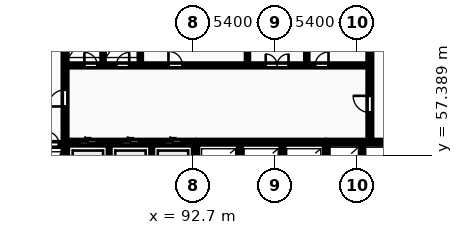
"""IFC4 building model, lengths in metres.
Left out: names, types, materials, properties, quantities, classifications, styles, units other than length and angle.
Written with IfcOpenShell. Run it as: python <this file> out.ifc"""

import sys

from ifc_helpers import new_model, si_unit, direction, frame, frame_2d, origin, place, context, subcontext, project, spatial, rectangle, extrude, element, fill, save


model = new_model("IFC4")
c1 = context("Model", 3, precision=1e-05, world=origin(), true_north=direction((0.0, 1.0)))
c2 = subcontext(c1, "Body", "Model", "MODEL_VIEW")
j1 = project(units=[si_unit("LENGTHUNIT", "METRE"), si_unit("PLANEANGLEUNIT", "RADIAN")], contexts=[c1])
p1 = place(None, origin())
s1 = spatial("IfcSite", under=j1, at=p1, CompositionType="ELEMENT")
p2 = place(p1, origin())
s2 = spatial("IfcBuilding", under=s1, at=p2, CompositionType="ELEMENT")
p3 = place(p2, frame((0.0, 0.0, 10.0)))
s3 = spatial("IfcBuildingStorey", under=s2, at=p3, CompositionType="ELEMENT", Elevation=10.0)
p4 = place(p3, frame((79.79, 58.1, 0.0), z_axis=(0.0, 0.0, 1.0), x_axis=(1.0, 0.0, 0.0)))
e1 = element("IfcWall", 1, at=p4, inside=s3, PredefinedType="SHEAR", context=c2, shape_type="SweptSolid", body=[
    extrude(rectangle(XDim=4.39, YDim=0.25, at=frame_2d((2.195, 0.0))), origin(), (0.0, 0.0, 1.0), 4.5),
])
p5 = place(p4, frame((1.05, 0.0, 0.0)))
e2 = element("IfcOpeningElement", 2, at=p5, cuts=e1, PredefinedType="OPENING", context=c2, shape_type="SweptSolid", body=[
    extrude(rectangle(XDim=1.12, YDim=2.12, at=frame_2d((0.56, 1.06))), frame((0.0, 0.135, 0.0), z_axis=(0.0, -1.0, 0.0), x_axis=(1.0, 0.0, 0.0)), (0.0, 0.0, 1.0), 0.27),
])
p6 = place(p4, frame((3.26, 0.0, 0.0)))
e3 = element("IfcOpeningElement", 3, at=p6, cuts=e1, PredefinedType="OPENING", context=c2, shape_type="SweptSolid", body=[
    extrude(rectangle(XDim=0.85, YDim=2.05, at=frame_2d((0.425, 1.025))), frame((0.0, 0.135, 0.0), z_axis=(0.0, -1.0, 0.0), x_axis=(1.0, 0.0, 0.0)), (0.0, 0.0, 1.0), 0.27),
])
p7 = place(p3, frame((84.3, 55.4, 0.0), z_axis=(0.0, 0.0, 1.0), x_axis=(0.0, 1.0, 0.0)))
e4 = element("IfcWall", 4, at=p7, inside=s3, PredefinedType="SHEAR", context=c2, shape_type="SweptSolid", body=[
    extrude(rectangle(XDim=11.6, YDim=0.25, at=frame_2d((5.8, 0.0))), origin(), (0.0, 0.0, 1.0), 4.5),
])
p8 = place(p7, frame((5.2, 0.0, 0.0)))
e5 = element("IfcOpeningElement", 5, at=p8, cuts=e4, PredefinedType="OPENING", context=c2, shape_type="SweptSolid", body=[
    extrude(rectangle(XDim=1.1, YDim=2.1, at=frame_2d((0.55, 1.05))), frame((0.0, 0.135, 0.0), z_axis=(0.0, -1.0, 0.0), x_axis=(1.0, 0.0, 0.0)), (0.0, 0.0, 1.0), 0.27),
])
for number, where, z_axis, x_axis in (
    (6, (87.2, 55.4, 0.0), (0.0, 0.0, 1.0), (0.0, 1.0, 0.0)),
    (7, (90.0, 55.4, 0.0), (0.0, 0.0, 1.0), (0.0, 1.0, 0.0)),
):
    element("IfcWall", number, at=place(p3, frame(where, z_axis=z_axis, x_axis=x_axis)), inside=s3, PredefinedType="PARTITIONING", context=c2, shape_type="SweptSolid", body=[
        extrude(rectangle(XDim=2.72, YDim=0.2, at=frame_2d((1.36, 0.0))), origin(), (0.0, 0.0, 1.0), 4.2),
    ])
p9 = place(p3, frame((84.42, 58.25, 0.0), z_axis=(0.0, 0.0, 1.0), x_axis=(1.0, 0.0, 0.0)))
e8 = element("IfcWall", 8, at=p9, inside=s3, PredefinedType="SHEAR", context=c2, shape_type="SweptSolid", body=[
    extrude(rectangle(XDim=8.36, YDim=0.25, at=frame_2d((4.18, 0.0))), origin(), (0.0, 0.0, 1.0), 4.5),
])
p10 = place(p9, frame((0.82, 0.0, 0.0)))
e9 = element("IfcOpeningElement", 9, at=p10, cuts=e8, PredefinedType="OPENING", context=c2, shape_type="SweptSolid", body=[
    extrude(rectangle(XDim=1.12, YDim=2.12, at=frame_2d((0.56, 1.06))), frame((0.0, 0.135, 0.0), z_axis=(0.0, -1.0, 0.0), x_axis=(1.0, 0.0, 0.0)), (0.0, 0.0, 1.0), 0.27),
])
p11 = place(p9, frame((3.62, 0.0, 0.0)))
e10 = element("IfcOpeningElement", 10, at=p11, cuts=e8, PredefinedType="OPENING", context=c2, shape_type="SweptSolid", body=[
    extrude(rectangle(XDim=1.12, YDim=2.12, at=frame_2d((0.56, 1.06))), frame((0.0, 0.135, 0.0), z_axis=(0.0, -1.0, 0.0), x_axis=(1.0, 0.0, 0.0)), (0.0, 0.0, 1.0), 0.27),
])
p12 = place(p9, frame((6.42, 0.0, 0.0)))
e11 = element("IfcOpeningElement", 11, at=p12, cuts=e8, PredefinedType="OPENING", context=c2, shape_type="SweptSolid", body=[
    extrude(rectangle(XDim=1.12, YDim=2.12, at=frame_2d((0.56, 1.06))), frame((0.0, 0.135, 0.0), z_axis=(0.0, -1.0, 0.0), x_axis=(1.0, 0.0, 0.0)), (0.0, 0.0, 1.0), 0.27),
])
p13 = place(p3, frame((92.9, 55.4, 0.0), z_axis=(0.0, 0.0, 1.0), x_axis=(0.0, 1.0, 0.0)))
e12 = element("IfcWall", 12, at=p13, inside=s3, PredefinedType="SHEAR", context=c2, shape_type="SweptSolid", body=[
    extrude(rectangle(XDim=2.85, YDim=0.25, at=frame_2d((1.425, 0.0))), origin(), (0.0, 0.0, 1.0), 4.5),
])
for number, where, z_axis, x_axis in (
    (13, (95.8, 55.4, 0.0), (0.0, 0.0, 1.0), (0.0, 1.0, 0.0)),
    (14, (98.6, 55.4, 0.0), (0.0, 0.0, 1.0), (0.0, 1.0, 0.0)),
):
    element("IfcWall", number, at=place(p3, frame(where, z_axis=z_axis, x_axis=x_axis)), inside=s3, PredefinedType="PARTITIONING", context=c2, shape_type="SweptSolid", body=[
        extrude(rectangle(XDim=2.72, YDim=0.2, at=frame_2d((1.36, 0.0))), origin(), (0.0, 0.0, 1.0), 4.2),
    ])
p14 = place(p3, frame((93.02, 58.25, 0.0), z_axis=(0.0, 0.0, 1.0), x_axis=(1.0, 0.0, 0.0)))
e15 = element("IfcWall", 15, at=p14, inside=s3, PredefinedType="SHEAR", context=c2, shape_type="SweptSolid", body=[
    extrude(rectangle(XDim=8.36, YDim=0.25, at=frame_2d((4.18, 0.0))), origin(), (0.0, 0.0, 1.0), 4.5),
])
p15 = place(p3, frame((101.48, 55.4, 0.0), z_axis=(0.0, 0.0, 1.0), x_axis=(0.0, 1.0, 0.0)))
e16 = element("IfcWall", 16, at=p15, inside=s3, PredefinedType="SHEAR", context=c2, shape_type="SweptSolid", body=[
    extrude(rectangle(XDim=2.85, YDim=0.25, at=frame_2d((1.425, 0.0))), origin(), (0.0, 0.0, 1.0), 4.5),
])
p16 = place(p3, frame((103.85, 55.4, 0.0), z_axis=(0.0, 0.0, 1.0), x_axis=(0.0, 1.0, 0.0)))
e17 = element("IfcWall", 17, at=p16, inside=s3, PredefinedType="PARTITIONING", context=c2, shape_type="SweptSolid", body=[
    extrude(rectangle(XDim=2.72, YDim=0.2, at=frame_2d((1.36, 0.0))), origin(), (0.0, 0.0, 1.0), 4.2),
])
p17 = place(p3, frame((101.55, 58.25, 0.0), z_axis=(0.0, 0.0, 1.0), x_axis=(1.0, 0.0, 0.0)))
e18 = element("IfcWall", 18, at=p17, inside=s3, PredefinedType="SHEAR", context=c2, shape_type="SweptSolid", body=[
    extrude(rectangle(XDim=4.6, YDim=0.25, at=frame_2d((2.3, 0.0))), origin(), (0.0, 0.0, 1.0), 4.5),
])
for number, where, z_axis, x_axis in (
    (19, (86.8, 63.4, 0.0), (0.0, 0.0, 1.0), (0.0, 1.0, 0.0)),
    (20, (89.25, 63.4, 0.0), (0.0, 0.0, 1.0), (0.0, 1.0, 0.0)),
    (21, (96.3, 63.4, 0.0), (0.0, 0.0, 1.0), (0.0, 1.0, 0.0)),
    (22, (100.2, 63.4, 0.0), (0.0, 0.0, 1.0), (0.0, 1.0, 0.0)),
):
    element("IfcWall", number, at=place(p3, frame(where, z_axis=z_axis, x_axis=x_axis)), inside=s3, PredefinedType="PARTITIONING", context=c2, shape_type="SweptSolid", body=[
        extrude(rectangle(XDim=3.6, YDim=0.15, at=frame_2d((1.8, 0.0))), origin(), (0.0, 0.0, 1.0), 4.2),
    ])
p18 = place(p3, frame((84.42, 63.3, 0.0), z_axis=(0.0, 0.0, 1.0), x_axis=(1.0, 0.0, 0.0)))
e23 = element("IfcWall", 23, at=p18, inside=s3, PredefinedType="PARTITIONING", context=c2, shape_type="SweptSolid", body=[
    extrude(rectangle(XDim=19.83, YDim=0.2, at=frame_2d((9.915, 0.0))), origin(), (0.0, 0.0, 1.0), 4.2),
])
p19 = place(p18, frame((1.15, 0.0, 0.0)))
e24 = element("IfcOpeningElement", 24, at=p19, cuts=e23, PredefinedType="OPENING", context=c2, shape_type="SweptSolid", body=[
    extrude(rectangle(XDim=0.85, YDim=2.05, at=frame_2d((0.425, 1.025))), frame((0.0, 0.11, 0.0), z_axis=(0.0, -1.0, 0.0), x_axis=(1.0, 0.0, 0.0)), (0.0, 0.0, 1.0), 0.22),
])
p20 = place(p18, frame((3.25, 0.0, 0.0)))
e25 = element("IfcOpeningElement", 25, at=p20, cuts=e23, PredefinedType="OPENING", context=c2, shape_type="SweptSolid", body=[
    extrude(rectangle(XDim=0.85, YDim=2.05, at=frame_2d((0.425, 1.025))), frame((0.0, 0.11, 0.0), z_axis=(0.0, -1.0, 0.0), x_axis=(1.0, 0.0, 0.0)), (0.0, 0.0, 1.0), 0.22),
])
p21 = place(p18, frame((13.08, 0.0, 0.0)))
e26 = element("IfcOpeningElement", 26, at=p21, cuts=e23, PredefinedType="OPENING", context=c2, shape_type="SweptSolid", body=[
    extrude(rectangle(XDim=1.5, YDim=2.2, at=frame_2d((0.75, 1.1))), frame((0.0, 0.11, 0.0), z_axis=(0.0, -1.0, 0.0), x_axis=(1.0, 0.0, 0.0)), (0.0, 0.0, 1.0), 0.22),
])
p22 = place(p18, frame((6.68, 0.0, 0.0)))
e27 = element("IfcOpeningElement", 27, at=p22, cuts=e23, PredefinedType="OPENING", context=c2, shape_type="SweptSolid", body=[
    extrude(rectangle(XDim=0.92, YDim=2.08, at=frame_2d((0.46, 1.04))), frame((0.0, 0.11, 0.0), z_axis=(0.0, -1.0, 0.0), x_axis=(1.0, 0.0, 0.0)), (0.0, 0.0, 1.0), 0.22),
])
p23 = place(p18, frame((16.33, 0.0, 0.0)))
e28 = element("IfcOpeningElement", 28, at=p23, cuts=e23, PredefinedType="OPENING", context=c2, shape_type="SweptSolid", body=[
    extrude(rectangle(XDim=0.88, YDim=2.06, at=frame_2d((0.44, 1.03))), frame((0.0, 0.11, 0.0), z_axis=(0.0, -1.0, 0.0), x_axis=(1.0, 0.0, 0.0)), (0.0, 0.0, 1.0), 0.22),
])
p24 = place(p3, frame((104.35, 58.4, 0.0), z_axis=(0.0, 0.0, 1.0), x_axis=(0.0, 1.0, 0.0)))
e29 = element("IfcWall", 29, at=p24, inside=s3, PredefinedType="SHEAR", context=c2, shape_type="SweptSolid", body=[
    extrude(rectangle(XDim=8.6, YDim=0.25, at=frame_2d((4.3, 0.0))), origin(), (0.0, 0.0, 1.0), 4.5),
])
p25 = place(p24, frame((1.8, 0.0, 0.0)))
e30 = element("IfcOpeningElement", 30, at=p25, cuts=e29, PredefinedType="OPENING", context=c2, shape_type="SweptSolid", body=[
    extrude(rectangle(XDim=1.1, YDim=2.1, at=frame_2d((0.55, 1.05))), frame((0.0, 0.135, 0.0), z_axis=(0.0, -1.0, 0.0), x_axis=(1.0, 0.0, 0.0)), (0.0, 0.0, 1.0), 0.27),
])
p26 = place(p6, origin())
e31 = element("IfcDoor", 31, at=p26, inside=s3, OperationType="SINGLE_SWING_LEFT", PredefinedType="DOOR", context=c2, shape_type="SweptSolid", body=[
    extrude(rectangle(XDim=0.85, YDim=2.05, at=frame_2d((0.425, 1.025))), frame((0.0, 0.025, 0.0), z_axis=(0.0, -1.0, 0.0), x_axis=(1.0, 0.0, 0.0)), (0.0, 0.0, 1.0), 0.05),
])
fill(e3, e31)
p27 = place(p8, origin())
e32 = element("IfcDoor", 32, at=p27, inside=s3, OperationType="SINGLE_SWING_LEFT", PredefinedType="DOOR", context=c2, shape_type="SweptSolid", body=[
    extrude(rectangle(XDim=1.1, YDim=2.1, at=frame_2d((0.55, 1.05))), frame((0.0, 0.025, 0.0), z_axis=(0.0, -1.0, 0.0), x_axis=(1.0, 0.0, 0.0)), (0.0, 0.0, 1.0), 0.05),
])
fill(e5, e32)
p28 = place(p10, origin())
e33 = element("IfcDoor", 33, at=p28, inside=s3, OperationType="SLIDING_TO_LEFT", PredefinedType="DOOR", context=c2, shape_type="SweptSolid", body=[
    extrude(rectangle(XDim=1.12, YDim=2.12, at=frame_2d((0.56, 1.06))), frame((0.0, 0.025, 0.0), z_axis=(0.0, -1.0, 0.0), x_axis=(1.0, 0.0, 0.0)), (0.0, 0.0, 1.0), 0.05),
])
fill(e9, e33)
p29 = place(p11, origin())
e34 = element("IfcDoor", 34, at=p29, inside=s3, OperationType="SLIDING_TO_LEFT", PredefinedType="DOOR", context=c2, shape_type="SweptSolid", body=[
    extrude(rectangle(XDim=1.12, YDim=2.12, at=frame_2d((0.56, 1.06))), frame((0.0, 0.025, 0.0), z_axis=(0.0, -1.0, 0.0), x_axis=(1.0, 0.0, 0.0)), (0.0, 0.0, 1.0), 0.05),
])
fill(e10, e34)
p30 = place(p12, origin())
e35 = element("IfcDoor", 35, at=p30, inside=s3, OperationType="SLIDING_TO_LEFT", PredefinedType="DOOR", context=c2, shape_type="SweptSolid", body=[
    extrude(rectangle(XDim=1.12, YDim=2.12, at=frame_2d((0.56, 1.06))), frame((0.0, 0.025, 0.0), z_axis=(0.0, -1.0, 0.0), x_axis=(1.0, 0.0, 0.0)), (0.0, 0.0, 1.0), 0.05),
])
fill(e11, e35)
p31 = place(p19, origin())
e36 = element("IfcDoor", 36, at=p31, inside=s3, OperationType="SINGLE_SWING_LEFT", PredefinedType="DOOR", context=c2, shape_type="SweptSolid", body=[
    extrude(rectangle(XDim=0.85, YDim=2.05, at=frame_2d((0.425, 1.025))), frame((0.0, 0.025, 0.0), z_axis=(0.0, -1.0, 0.0), x_axis=(1.0, 0.0, 0.0)), (0.0, 0.0, 1.0), 0.05),
])
fill(e24, e36)
p32 = place(p20, origin())
e37 = element("IfcDoor", 37, at=p32, inside=s3, OperationType="SINGLE_SWING_RIGHT", PredefinedType="DOOR", context=c2, shape_type="SweptSolid", body=[
    extrude(rectangle(XDim=0.85, YDim=2.05, at=frame_2d((0.425, 1.025))), frame((0.0, 0.025, 0.0), z_axis=(0.0, -1.0, 0.0), x_axis=(1.0, 0.0, 0.0)), (0.0, 0.0, 1.0), 0.05),
])
fill(e25, e37)
p33 = place(p21, origin())
e38 = element("IfcDoor", 38, at=p33, inside=s3, OperationType="DOUBLE_DOOR_SINGLE_SWING", PredefinedType="DOOR", context=c2, shape_type="SweptSolid", body=[
    extrude(rectangle(XDim=1.5, YDim=2.2, at=frame_2d((0.75, 1.1))), frame((0.0, 0.025, 0.0), z_axis=(0.0, -1.0, 0.0), x_axis=(1.0, 0.0, 0.0)), (0.0, 0.0, 1.0), 0.05),
])
fill(e26, e38)
p34 = place(p22, origin())
e39 = element("IfcDoor", 39, at=p34, inside=s3, OperationType="SINGLE_SWING_LEFT", PredefinedType="DOOR", context=c2, shape_type="SweptSolid", body=[
    extrude(rectangle(XDim=0.92, YDim=2.08, at=frame_2d((0.46, 1.04))), frame((0.0, 0.025, 0.0), z_axis=(0.0, -1.0, 0.0), x_axis=(1.0, 0.0, 0.0)), (0.0, 0.0, 1.0), 0.05),
])
fill(e27, e39)
p35 = place(p23, origin())
e40 = element("IfcDoor", 40, at=p35, inside=s3, OperationType="SINGLE_SWING_RIGHT", PredefinedType="DOOR", context=c2, shape_type="SweptSolid", body=[
    extrude(rectangle(XDim=0.88, YDim=2.06, at=frame_2d((0.44, 1.03))), frame((0.0, 0.025, 0.0), z_axis=(0.0, -1.0, 0.0), x_axis=(1.0, 0.0, 0.0)), (0.0, 0.0, 1.0), 0.05),
])
fill(e28, e40)
p36 = place(p25, origin())
e41 = element("IfcDoor", 41, at=p36, inside=s3, OperationType="SINGLE_SWING_RIGHT", PredefinedType="DOOR", context=c2, shape_type="SweptSolid", body=[
    extrude(rectangle(XDim=1.1, YDim=2.1, at=frame_2d((0.55, 1.05))), frame((0.0, 0.025, 0.0), z_axis=(0.0, -1.0, 0.0), x_axis=(1.0, 0.0, 0.0)), (0.0, 0.0, 1.0), 0.05),
])
fill(e30, e41)
save(model, sys.argv[1])
